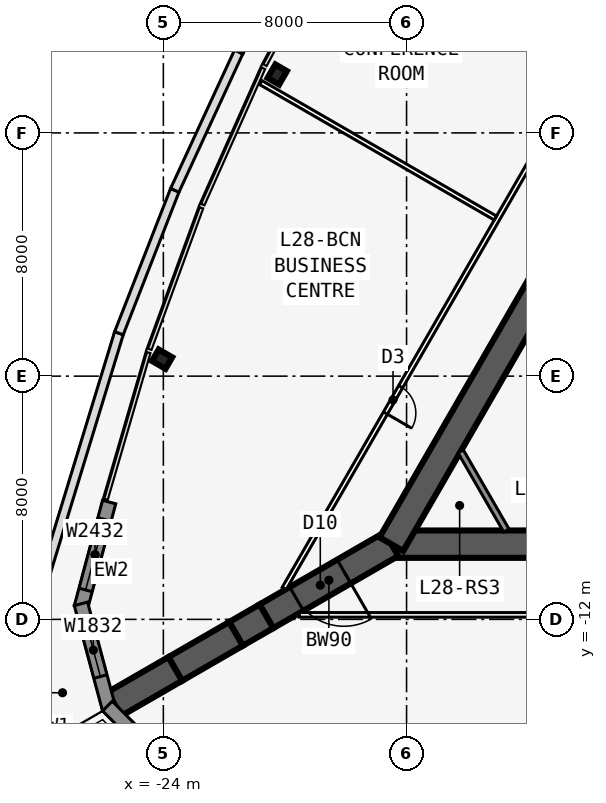
"""IFC4 building model, lengths in metres.
Left out: names, types, materials, properties, quantities, classifications, styles, units other than length and angle.
Written with IfcOpenShell. Run it as: python <this file> out.ifc"""

import sys

from ifc_helpers import new_model, si_unit, direction, frame, frame_2d, origin, origin_2d, place, context, subcontext, project, spatial, polyline, rectangle, i_section, outline, extrude, element, fill, save


model = new_model("IFC4")
c1 = context("Model", 3, precision=1e-05, world=origin(), true_north=direction((0.0, 1.0)))
c2 = subcontext(c1, "Body", "Model", "MODEL_VIEW")
j1 = project(units=[si_unit("LENGTHUNIT", "METRE"), si_unit("PLANEANGLEUNIT", "RADIAN")], contexts=[c1])
p1 = place(None, origin())
s1 = spatial("IfcSite", under=j1, at=p1, CompositionType="ELEMENT")
p2 = place(p1, origin())
s2 = spatial("IfcBuilding", under=s1, at=p2, CompositionType="ELEMENT")
p3 = place(p2, frame((0.0, 0.0, 109.7)))
s3 = spatial("IfcBuildingStorey", under=s2, at=p3, CompositionType="ELEMENT", Elevation=109.7)
p4 = place(p3, frame((-16.5, -9.526, 0.0), z_axis=(0.0, 0.0, 1.0), x_axis=(1.0, 0.0, 0.0)))
e1 = element("IfcWall", 1, at=p4, inside=s3, PredefinedType="SHEAR", context=c2, shape_type="SweptSolid", body=[
    extrude(rectangle(XDim=33.0, YDim=0.9, at=frame_2d((16.5, 0.0))), origin(), (0.0, 0.0, 1.0), 5.0),
])
p5 = place(p4, frame((14.05, 0.0, 0.0)))
e2 = element("IfcOpeningElement", 2, at=p5, cuts=e1, PredefinedType="OPENING", context=c2, shape_type="SweptSolid", body=[
    extrude(rectangle(XDim=1.8, YDim=2.13, at=frame_2d((0.9, 1.065))), frame((0.0, 0.46, 0.0), z_axis=(0.0, -1.0, 0.0), x_axis=(1.0, 0.0, 0.0)), (0.0, 0.0, 1.0), 0.92),
])
p6 = place(p3, frame((0.0, 19.052, 0.0), z_axis=(0.0, 0.0, 1.0), x_axis=(-0.499999749417, -0.866025548458, 0.0)))
e3 = element("IfcWall", 3, at=p6, inside=s3, PredefinedType="SHEAR", context=c2, shape_type="SweptSolid", body=[
    extrude(rectangle(XDim=33.0, YDim=0.9, at=frame_2d((16.5, 0.0))), origin(), (0.0, 0.0, 1.0), 5.0),
])
p7 = place(p6, frame((14.15, 0.0, 0.0)))
e4 = element("IfcOpeningElement", 4, at=p7, cuts=e3, PredefinedType="OPENING", context=c2, shape_type="SweptSolid", body=[
    extrude(rectangle(XDim=1.8, YDim=2.13, at=frame_2d((0.9, 1.065))), frame((0.0, 0.46, 0.0), z_axis=(0.0, -1.0, 0.0), x_axis=(1.0, 0.0, 0.0)), (0.0, 0.0, 1.0), 0.92),
])
p8 = place(p6, frame((12.6, 0.0, 0.0)))
e5 = element("IfcOpeningElement", 5, at=p8, cuts=e3, PredefinedType="OPENING", context=c2, shape_type="SweptSolid", body=[
    extrude(rectangle(XDim=1.0, YDim=2.13, at=frame_2d((0.5, 1.065))), frame((0.0, 0.46, 0.0), z_axis=(0.0, -1.0, 0.0), x_axis=(1.0, 0.0, 0.0)), (0.0, 0.0, 1.0), 0.92),
])
p9 = place(p3, frame((-9.329, -4.256, 0.0), z_axis=(0.0, 0.0, 1.0), x_axis=(-0.866022959057, 0.500004234368, 0.0)))
e6 = element("IfcWall", 6, at=p9, inside=s3, PredefinedType="SOLIDWALL", context=c2, shape_type="SweptSolid", body=[
    extrude(rectangle(XDim=3.125, YDim=0.2, at=frame_2d((1.562, 0.0))), origin(), (0.0, 0.0, 1.0), 4.835),
])
p10 = place(p3, frame((-16.5, -9.526, 0.0), z_axis=(0.0, 0.0, 1.0), x_axis=(-0.866031398331, -0.499989616998, 0.0)))
e7 = element("IfcWall", 7, at=p10, inside=s3, PredefinedType="SHEAR", context=c2, shape_type="SweptSolid", body=[
    extrude(rectangle(XDim=4.746, YDim=0.9, at=frame_2d((2.373, 0.0))), origin(), (0.0, 0.0, 1.0), 5.0),
])
p11 = place(p10, frame((1.8, 0.0, 0.0)))
e8 = element("IfcOpeningElement", 8, at=p11, cuts=e7, PredefinedType="OPENING", context=c2, shape_type="SweptSolid", body=[
    extrude(rectangle(XDim=1.8, YDim=2.13, at=frame_2d((0.9, 1.065))), frame((0.0, 0.46, 0.0), z_axis=(0.0, -1.0, 0.0), x_axis=(1.0, 0.0, 0.0)), (0.0, 0.0, 1.0), 0.92),
])
p12 = place(p3, frame((-20.61, -11.899, 0.0), z_axis=(0.0, 0.0, 1.0), x_axis=(-0.866009537788, -0.500027479704, 0.0)))
e9 = element("IfcWall", 9, at=p12, inside=s3, PredefinedType="SHEAR", context=c2, shape_type="SweptSolid", body=[
    extrude(rectangle(XDim=1.155, YDim=0.9, at=frame_2d((0.577, 0.0))), origin(), (0.0, 0.0, 1.0), 5.0),
])
for number, where, z_axis, x_axis in (
    (10, (-21.61, -12.477, 0.0), (0.0, 0.0, 1.0), (-0.866, -0.5, 0.0)),
    (11, (-23.61, -13.631, 0.0), (0.0, 0.0, 1.0), (-0.866, -0.5, 0.0)),
):
    element("IfcWall", number, at=place(p3, frame(where, z_axis=z_axis, x_axis=x_axis)), inside=s3, PredefinedType="SHEAR", context=c2, shape_type="SweptSolid", body=[
        extrude(rectangle(XDim=2.309, YDim=0.9, at=frame_2d((1.155, 0.0))), origin(), (0.0, 0.0, 1.0), 5.0),
    ])
for number, where, z_axis, x_axis in (
    (12, (-20.254, 5.92, 0.0), (0.0, 0.0, 1.0), (-0.866, 0.5, 0.0)),
    (13, (-24.041, -3.44, 0.0), (0.0, 0.0, 1.0), (-0.5, -0.866, 0.0)),
):
    element("IfcColumn", number, at=place(p3, frame(where, z_axis=z_axis, x_axis=x_axis)), inside=s3, PredefinedType="COLUMN", context=c2, shape_type="SweptSolid", body=[
        extrude(i_section(OverallWidth=0.437, OverallDepth=0.513, WebThickness=0.061, FlangeThickness=0.097, at=origin_2d()), origin(), (0.0, 0.0, 1.0), 5.0),
    ])
p13 = place(p3, frame((-25.783, -8.141, 0.0), z_axis=(0.0, 0.0, 1.0), x_axis=(-0.258823421857, -0.965924653531, 0.0)))
e14 = element("IfcWall", 14, at=p13, inside=s3, PredefinedType="SOLIDWALL", context=c2, shape_type="SweptSolid", body=[
    extrude(rectangle(XDim=3.586, YDim=0.45, at=frame_2d((1.793, 0.0))), origin(), (0.0, 0.0, 1.0), 4.835),
])
p14 = place(p13, frame((0.593, 0.0, 0.6)))
e15 = element("IfcOpeningElement", 15, at=p14, cuts=e14, PredefinedType="OPENING", context=c2, shape_type="SweptSolid", body=[
    extrude(rectangle(XDim=2.4, YDim=3.2, at=frame_2d((1.2, 1.6))), frame((0.0, 0.235, 0.0), z_axis=(0.0, -1.0, 0.0), x_axis=(1.0, 0.0, 0.0)), (0.0, 0.0, 1.0), 0.47),
])
p15 = place(p3, frame((-26.711, -11.489, 0.0), z_axis=(0.0, 0.0, 1.0), x_axis=(0.258823421857, -0.965924653531, 0.0)))
e16 = element("IfcWall", 16, at=p15, inside=s3, PredefinedType="SOLIDWALL", context=c2, shape_type="SweptSolid", body=[
    extrude(outline(polyline([(3.586, 0.225), (3.527, 0.225), (3.035, 0.093), (3.0, 0.225), (0.0, 0.225), (0.0, -0.225), (3.586, -0.225), (3.586, 0.225)])), origin(), (0.0, 0.0, 1.0), 4.835),
])
p16 = place(p15, frame((0.675, 0.0, 0.6)))
e17 = element("IfcOpeningElement", 17, at=p16, cuts=e16, PredefinedType="OPENING", context=c2, shape_type="SweptSolid", body=[
    extrude(rectangle(XDim=1.8, YDim=3.2, at=frame_2d((0.9, 1.6))), frame((0.0, 0.235, 0.0), z_axis=(0.0, -1.0, 0.0), x_axis=(1.0, 0.0, 0.0)), (0.0, 0.0, 1.0), 0.47),
])
p17 = place(p3, frame((-25.841, -14.852, 0.0), z_axis=(0.0, 0.0, 1.0), x_axis=(0.707106781187, -0.707106781187, 0.0)))
e18 = element("IfcWall", 18, at=p17, inside=s3, PredefinedType="SOLIDWALL", context=c2, shape_type="SweptSolid", body=[
    extrude(outline(polyline([(3.586, 0.225), (0.586, 0.225), (0.551, 0.093), (0.059, 0.225), (0.0, 0.225), (0.0, -0.225), (3.586, -0.225), (3.586, 0.225)])), origin(), (0.0, 0.0, 1.0), 4.835),
])
p18 = place(p17, frame((1.111, 0.0, 0.6)))
e19 = element("IfcOpeningElement", 19, at=p18, cuts=e18, PredefinedType="OPENING", context=c2, shape_type="SweptSolid", body=[
    extrude(rectangle(XDim=1.8, YDim=3.2, at=frame_2d((0.9, 1.6))), frame((0.0, 0.235, 0.0), z_axis=(0.0, -1.0, 0.0), x_axis=(1.0, 0.0, 0.0)), (0.0, 0.0, 1.0), 0.47),
])
p19 = place(p3, frame((-27.856, -10.434, 0.0), z_axis=(0.0, 0.0, 1.0), x_axis=(0.291972778305, 0.956426629036, 0.0)))
e20 = element("IfcWall", 20, at=p19, inside=s3, PredefinedType="PARAPET", context=c2, shape_type="SweptSolid", body=[
    extrude(rectangle(XDim=8.203, YDim=0.3, at=frame_2d((4.102, 0.0))), origin(), (0.0, 0.0, 1.0), 1.1),
])
p20 = place(p3, frame((-25.461, -2.588, 0.0), z_axis=(0.0, 0.0, 1.0), x_axis=(0.364040028131, 0.931383303436, 0.0)))
e21 = element("IfcWall", 21, at=p20, inside=s3, PredefinedType="PARAPET", context=c2, shape_type="SweptSolid", body=[
    extrude(rectangle(XDim=5.047, YDim=0.3, at=frame_2d((2.524, 0.0))), origin(), (0.0, 0.0, 1.0), 1.1),
])
p21 = place(p3, frame((-23.623, 2.113, 0.0), z_axis=(0.0, 0.0, 1.0), x_axis=(0.419172470684, 0.907906625056, 0.0)))
e22 = element("IfcWall", 22, at=p21, inside=s3, PredefinedType="PARAPET", context=c2, shape_type="SweptSolid", body=[
    extrude(rectangle(XDim=5.012, YDim=0.3, at=frame_2d((2.506, 0.0))), origin(), (0.0, 0.0, 1.0), 1.1),
])
p22 = place(p3, frame((-21.522, 6.663, 0.0), z_axis=(0.0, 0.0, 1.0), x_axis=(0.473402806561, 0.880846060751, 0.0)))
e23 = element("IfcWall", 23, at=p22, inside=s3, PredefinedType="PARAPET", context=c2, shape_type="SweptSolid", body=[
    extrude(rectangle(XDim=4.993, YDim=0.3, at=frame_2d((2.497, 0.0))), origin(), (0.0, 0.0, 1.0), 1.1),
])
p23 = place(p3, frame((-19.527, -11.851, 0.0), z_axis=(0.0, 0.0, 1.0), x_axis=(1.0, 0.0, 0.0)))
e24 = element("IfcWall", 24, at=p23, inside=s3, PredefinedType="PARTITIONING", context=c2, shape_type="SweptSolid", body=[
    extrude(rectangle(XDim=39.054, YDim=0.15, at=frame_2d((19.527, 0.0))), origin(), (0.0, 0.0, 1.0), 4.835),
])
p24 = place(p23, frame((10.513, 0.0, 0.0)))
e25 = element("IfcOpeningElement", 25, at=p24, cuts=e24, PredefinedType="OPENING", context=c2, shape_type="SweptSolid", body=[
    extrude(rectangle(XDim=1.8, YDim=2.13, at=frame_2d((0.9, 1.065))), frame((0.0, 0.085, 0.0), z_axis=(0.0, -1.0, 0.0), x_axis=(1.0, 0.0, 0.0)), (0.0, 0.0, 1.0), 0.17),
])
p25 = place(p23, frame((24.027, 0.0, 0.0)))
e26 = element("IfcOpeningElement", 26, at=p25, cuts=e24, PredefinedType="OPENING", context=c2, shape_type="SweptSolid", body=[
    extrude(rectangle(XDim=1.0, YDim=2.13, at=frame_2d((0.5, 1.065))), frame((0.0, 0.085, 0.0), z_axis=(0.0, -1.0, 0.0), x_axis=(1.0, 0.0, 0.0)), (0.0, 0.0, 1.0), 0.17),
])
p26 = place(p23, frame((31.74, 0.0, 0.0)))
e27 = element("IfcOpeningElement", 27, at=p26, cuts=e24, PredefinedType="OPENING", context=c2, shape_type="SweptSolid", body=[
    extrude(rectangle(XDim=1.8, YDim=2.13, at=frame_2d((0.9, 1.065))), frame((0.0, 0.085, 0.0), z_axis=(0.0, -1.0, 0.0), x_axis=(1.0, 0.0, 0.0)), (0.0, 0.0, 1.0), 0.17),
])
p27 = place(p3, frame((-0.5, 22.836, 0.0), z_axis=(0.0, 0.0, 1.0), x_axis=(-0.500001677587, -0.866024435227, 0.0)))
e28 = element("IfcWall", 28, at=p27, inside=s3, PredefinedType="PARTITIONING", context=c2, shape_type="SweptSolid", body=[
    extrude(rectangle(XDim=39.054, YDim=0.15, at=frame_2d((19.527, 0.0))), origin(), (0.0, 0.0, 1.0), 4.835),
])
p28 = place(p27, frame((6.414, 0.0, 0.0)))
e29 = element("IfcOpeningElement", 29, at=p28, cuts=e28, PredefinedType="OPENING", context=c2, shape_type="SweptSolid", body=[
    extrude(rectangle(XDim=1.0, YDim=2.13, at=frame_2d((0.5, 1.065))), frame((0.0, 0.085, 0.0), z_axis=(0.0, -1.0, 0.0), x_axis=(1.0, 0.0, 0.0)), (0.0, 0.0, 1.0), 0.17),
])
p29 = place(p27, frame((15.527, 0.0, 0.0)))
e30 = element("IfcOpeningElement", 30, at=p29, cuts=e28, PredefinedType="OPENING", context=c2, shape_type="SweptSolid", body=[
    extrude(rectangle(XDim=1.0, YDim=2.13, at=frame_2d((0.5, 1.065))), frame((0.0, 0.085, 0.0), z_axis=(0.0, -1.0, 0.0), x_axis=(1.0, 0.0, 0.0)), (0.0, 0.0, 1.0), 0.17),
])
p30 = place(p27, frame((21.277, 0.0, 0.0)))
e31 = element("IfcOpeningElement", 31, at=p30, cuts=e28, PredefinedType="OPENING", context=c2, shape_type="SweptSolid", body=[
    extrude(rectangle(XDim=1.0, YDim=2.13, at=frame_2d((0.5, 1.065))), frame((0.0, 0.085, 0.0), z_axis=(0.0, -1.0, 0.0), x_axis=(1.0, 0.0, 0.0)), (0.0, 0.0, 1.0), 0.17),
])
p31 = place(p27, frame((31.39, 0.0, 0.0)))
e32 = element("IfcOpeningElement", 32, at=p31, cuts=e28, PredefinedType="OPENING", context=c2, shape_type="SweptSolid", body=[
    extrude(rectangle(XDim=1.0, YDim=2.13, at=frame_2d((0.5, 1.065))), frame((0.0, 0.085, 0.0), z_axis=(0.0, -1.0, 0.0), x_axis=(1.0, 0.0, 0.0)), (0.0, 0.0, 1.0), 0.17),
])
p32 = place(p3, frame((-13.079, 1.2, 0.0), z_axis=(0.0, 0.0, 1.0), x_axis=(-0.866017355174, 0.500013940344, 0.0)))
e33 = element("IfcWall", 33, at=p32, inside=s3, PredefinedType="PARTITIONING", context=c2, shape_type="SweptSolid", body=[
    extrude(rectangle(XDim=8.918, YDim=0.15, at=frame_2d((4.459, 0.0))), origin(), (0.0, 0.0, 1.0), 4.835),
])
p33 = place(p3, frame((-12.719, -9.076, 0.0), z_axis=(0.0, 0.0, 1.0), x_axis=(-0.499952404951, 0.866052881055, 0.0)))
e34 = element("IfcWall", 34, at=p33, inside=s3, PredefinedType="SOLIDWALL", context=c2, shape_type="SweptSolid", body=[
    extrude(rectangle(XDim=3.002, YDim=0.2, at=frame_2d((1.501, 0.0))), origin(), (0.0, 0.0, 1.0), 4.835),
])
p34 = place(p14, origin())
e35 = element("IfcWindow", 35, at=p34, inside=s3, PartitioningType="SINGLE_PANEL", PredefinedType="WINDOW", context=c2, shape_type="SweptSolid", body=[
    extrude(rectangle(XDim=2.4, YDim=3.2, at=frame_2d((1.2, 1.6))), frame((0.0, 0.03, 0.0), z_axis=(0.0, -1.0, 0.0), x_axis=(1.0, 0.0, 0.0)), (0.0, 0.0, 1.0), 0.06),
])
fill(e15, e35)
p35 = place(p16, origin())
e36 = element("IfcWindow", 36, at=p35, inside=s3, PartitioningType="SINGLE_PANEL", PredefinedType="WINDOW", context=c2, shape_type="SweptSolid", body=[
    extrude(rectangle(XDim=1.8, YDim=3.2, at=frame_2d((0.9, 1.6))), frame((0.0, 0.03, 0.0), z_axis=(0.0, -1.0, 0.0), x_axis=(1.0, 0.0, 0.0)), (0.0, 0.0, 1.0), 0.06),
])
fill(e17, e36)
p36 = place(p31, origin())
e37 = element("IfcDoor", 37, at=p36, inside=s3, OperationType="SINGLE_SWING_RIGHT", PredefinedType="DOOR", context=c2, shape_type="SweptSolid", body=[
    extrude(rectangle(XDim=1.0, YDim=2.13, at=frame_2d((0.5, 1.065))), frame((0.0, 0.025, 0.0), z_axis=(0.0, -1.0, 0.0), x_axis=(1.0, 0.0, 0.0)), (0.0, 0.0, 1.0), 0.05),
])
fill(e32, e37)
p37 = place(p11, origin())
e38 = element("IfcDoor", 38, at=p37, inside=s3, OperationType="DOUBLE_DOOR_DOUBLE_SWING", PredefinedType="DOOR", context=c2, shape_type="SweptSolid", body=[
    extrude(rectangle(XDim=1.8, YDim=2.13, at=frame_2d((0.9, 1.065))), frame((0.0, 0.025, 0.0), z_axis=(0.0, -1.0, 0.0), x_axis=(1.0, 0.0, 0.0)), (0.0, 0.0, 1.0), 0.05),
])
fill(e8, e38)
save(model, sys.argv[1])
